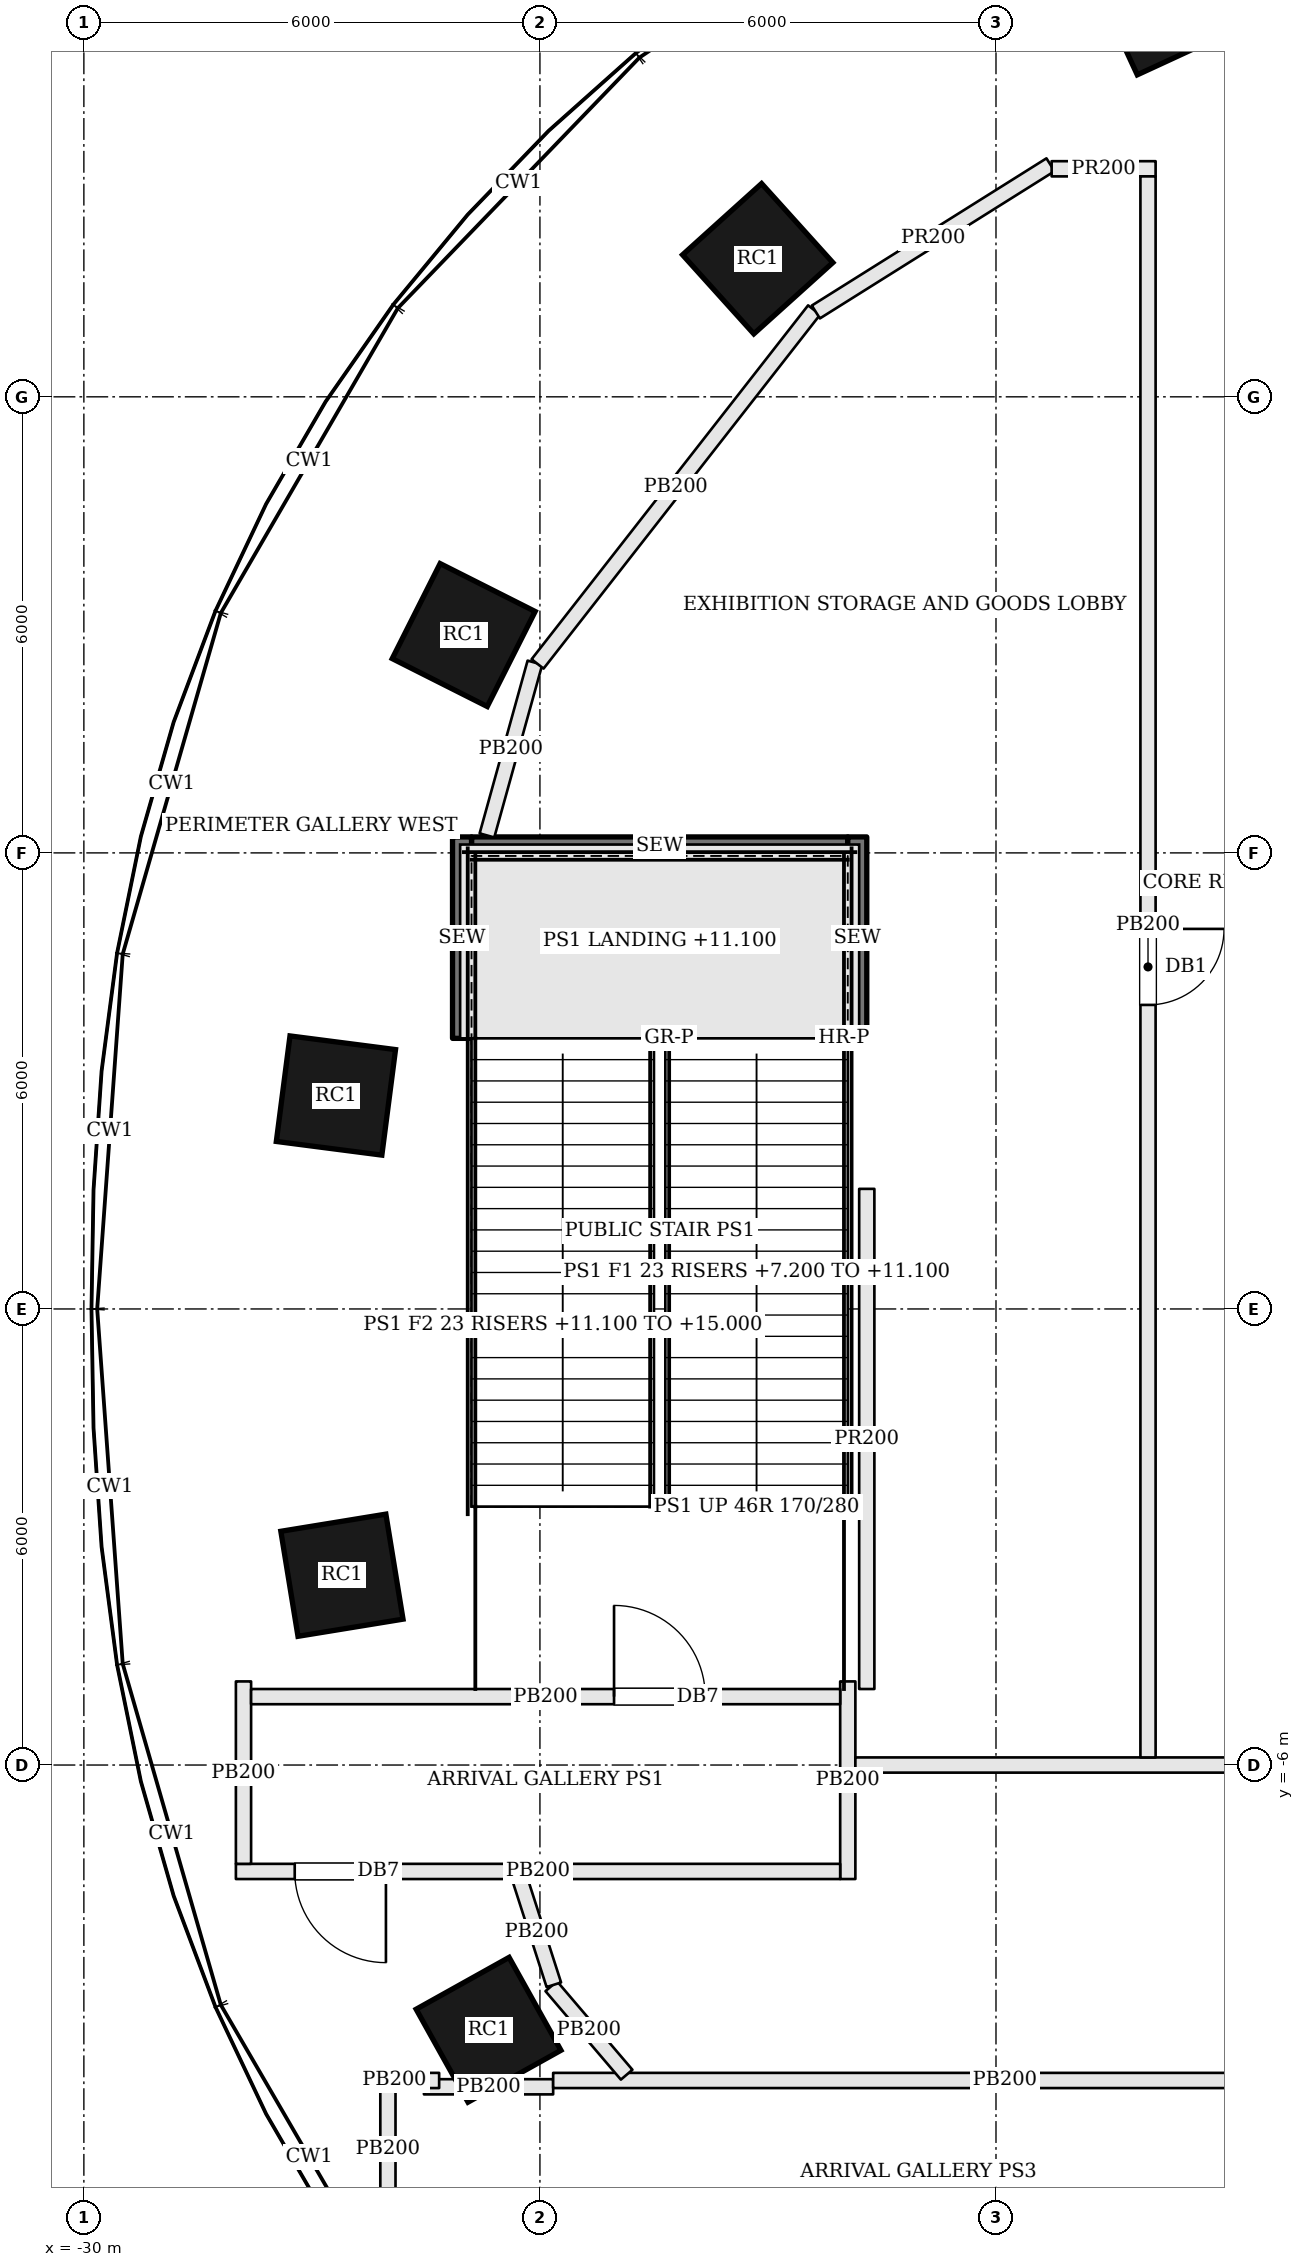
"""IFC4 building model, lengths in metres.
Left out: names, types, materials, properties, quantities, classifications, styles, units other than length and angle.
Written with IfcOpenShell. Run it as: python <this file> out.ifc"""

import sys

from ifc_helpers import new_model, si_unit, direction, frame, frame_2d, origin, origin_2d, place, context, subcontext, project, spatial, rectangle, extrude, element, fill, save


model = new_model("IFC4")
c1 = context("Model", 3, precision=1e-05, world=origin(), true_north=direction((0.0, 1.0)))
c2 = subcontext(c1, "Body", "Model", "MODEL_VIEW")
j1 = project(units=[si_unit("LENGTHUNIT", "METRE"), si_unit("PLANEANGLEUNIT", "RADIAN")], contexts=[c1])
p1 = place(None, origin())
s1 = spatial("IfcSite", under=j1, at=p1, CompositionType="ELEMENT")
p2 = place(p1, origin())
s2 = spatial("IfcBuilding", under=s1, at=p2, CompositionType="ELEMENT")
p3 = place(p2, frame((0.0, 0.0, 7.2)))
s3 = spatial("IfcBuildingStorey", under=s2, at=p3, CompositionType="ELEMENT", Elevation=7.2)
for number, where, z_axis, x_axis in (
    (1, (-15.799, 17.165, 0.0), (0.0, 0.0, 1.0), (-0.908, -0.419, 0.0)),
    (2, (-21.135, 13.817, 0.0), (0.0, 0.0, 1.0), (-0.743, -0.67, 0.0)),
    (3, (-25.003, 8.866, 0.0), (0.0, 0.0, 1.0), (-0.45, -0.893, 0.0)),
    (4, (-26.684, 2.808, 0.0), (0.0, 0.0, 1.0), (-0.128, -0.992, 0.0)),
    (5, (-26.605, -3.503, 0.0), (0.0, 0.0, 1.0), (0.161, -0.987, 0.0)),
    (6, (-24.676, -9.483, 0.0), (0.0, 0.0, 1.0), (0.487, -0.873, 0.0)),
):
    element("IfcColumn", number, at=place(p3, frame(where, z_axis=z_axis, x_axis=x_axis)), inside=s3, PredefinedType="COLUMN", context=c2, shape_type="SweptSolid", body=[
        extrude(rectangle(XDim=1.4, YDim=1.4, at=origin_2d()), origin(), (0.0, 0.0, 1.0), 7.8),
    ])
p4 = place(p3, frame((-19.95, -4.9, 0.0), z_axis=(0.0, 0.0, 1.0), x_axis=(0.0, -1.0, 0.0)))
e7 = element("IfcWall", 7, at=p4, inside=s3, PredefinedType="PARTITIONING", context=c2, shape_type="SweptSolid", body=[
    extrude(rectangle(XDim=2.6, YDim=0.2, at=frame_2d((1.3, 0.0))), origin(), (0.0, 0.0, 1.0), 6.83),
])
p5 = place(p3, frame((-20.05, -7.4, 0.0), z_axis=(0.0, 0.0, 1.0), x_axis=(-1.0, 0.0, 0.0)))
e8 = element("IfcWall", 8, at=p5, inside=s3, PredefinedType="PARTITIONING", context=c2, shape_type="SweptSolid", body=[
    extrude(rectangle(XDim=7.95, YDim=0.2, at=frame_2d((3.975, 0.0))), origin(), (0.0, 0.0, 1.0), 6.83),
])
p6 = place(p5, frame((5.976, 0.0, 0.0)))
e9 = element("IfcOpeningElement", 9, at=p6, cuts=e8, PredefinedType="OPENING", context=c2, shape_type="SweptSolid", body=[
    extrude(rectangle(XDim=1.2, YDim=2.1, at=frame_2d((0.6, 1.05))), frame((0.0, 0.11, 0.0), z_axis=(0.0, -1.0, 0.0), x_axis=(1.0, 0.0, 0.0)), (0.0, 0.0, 1.0), 0.22),
])
p7 = place(p3, frame((-27.9, -7.3, 0.0), z_axis=(0.0, 0.0, 1.0), x_axis=(0.0, 1.0, 0.0)))
e10 = element("IfcWall", 10, at=p7, inside=s3, PredefinedType="PARTITIONING", context=c2, shape_type="SweptSolid", body=[
    extrude(rectangle(XDim=2.4, YDim=0.2, at=frame_2d((1.2, 0.0))), origin(), (0.0, 0.0, 1.0), 6.83),
])
p8 = place(p3, frame((-27.8, -5.1, 0.0), z_axis=(0.0, 0.0, 1.0), x_axis=(1.0, 0.0, 0.0)))
e11 = element("IfcWall", 11, at=p8, inside=s3, PredefinedType="PARTITIONING", context=c2, shape_type="SweptSolid", body=[
    extrude(rectangle(XDim=7.75, YDim=0.2, at=frame_2d((3.875, 0.0))), origin(), (0.0, 0.0, 1.0), 6.83),
])
p9 = place(p8, frame((4.775, 0.0, 0.0)))
e12 = element("IfcOpeningElement", 12, at=p9, cuts=e11, PredefinedType="OPENING", context=c2, shape_type="SweptSolid", body=[
    extrude(rectangle(XDim=1.2, YDim=2.1, at=frame_2d((0.6, 1.05))), frame((0.0, 0.11, 0.0), z_axis=(0.0, -1.0, 0.0), x_axis=(1.0, 0.0, 0.0)), (0.0, 0.0, 1.0), 0.22),
])
p10 = place(p3, frame((-25.526, -10.233, 0.0), z_axis=(0.0, 0.0, 1.0), x_axis=(1.0, 0.0, 0.0)))
e13 = element("IfcWall", 13, at=p10, inside=s3, PredefinedType="PARTITIONING", context=c2, shape_type="SweptSolid", body=[
    extrude(rectangle(XDim=1.7, YDim=0.2, at=frame_2d((0.85, 0.0))), origin(), (0.0, 0.0, 1.0), 6.83),
])
p11 = place(p3, frame((-23.826, -10.15, 0.0), z_axis=(0.0, 0.0, 1.0), x_axis=(1.0, 0.0, 0.0)))
e14 = element("IfcWall", 14, at=p11, inside=s3, PredefinedType="PARTITIONING", context=c2, shape_type="SweptSolid", body=[
    extrude(rectangle(XDim=11.886, YDim=0.2, at=frame_2d((5.943, 0.0))), origin(), (0.0, 0.0, 1.0), 6.83),
])
p12 = place(p3, frame((-26.0, -12.063, 0.0), z_axis=(0.0, 0.0, 1.0), x_axis=(0.0, 1.0, 0.0)))
e15 = element("IfcWall", 15, at=p12, inside=s3, PredefinedType="PARTITIONING", context=c2, shape_type="SweptSolid", body=[
    extrude(rectangle(XDim=2.013, YDim=0.2, at=frame_2d((1.006, 0.0))), origin(), (0.0, 0.0, 1.0), 6.83),
])
p13 = place(p3, frame((-25.9, -10.15, 0.0), z_axis=(0.0, 0.0, 1.0), x_axis=(1.0, 0.0, 0.0)))
e16 = element("IfcWall", 16, at=p13, inside=s3, PredefinedType="PARTITIONING", context=c2, shape_type="SweptSolid", body=[
    extrude(rectangle(XDim=0.574, YDim=0.2, at=frame_2d((0.287, 0.0))), origin(), (0.0, 0.0, 1.0), 6.83),
])
p14 = place(p3, frame((-19.85, -6.0, 0.0), z_axis=(0.0, 0.0, 1.0), x_axis=(1.0, 0.0, 0.0)))
e17 = element("IfcWall", 17, at=p14, inside=s3, PredefinedType="PARTITIONING", context=c2, shape_type="SweptSolid", body=[
    extrude(rectangle(XDim=39.7, YDim=0.2, at=frame_2d((19.85, 0.0))), origin(), (0.0, 0.0, 1.0), 6.83),
])
p15 = place(p14, frame((13.172, 0.0, 0.0)))
e18 = element("IfcOpeningElement", 18, at=p15, cuts=e17, PredefinedType="OPENING", context=c2, shape_type="SweptSolid", body=[
    extrude(rectangle(XDim=1.2, YDim=2.1, at=frame_2d((0.6, 1.05))), frame((0.0, 0.11, 0.0), z_axis=(0.0, -1.0, 0.0), x_axis=(1.0, 0.0, 0.0)), (0.0, 0.0, 1.0), 0.22),
])
p16 = place(p14, frame((24.211, 0.0, 0.0)))
e19 = element("IfcOpeningElement", 19, at=p16, cuts=e17, PredefinedType="OPENING", context=c2, shape_type="SweptSolid", body=[
    extrude(rectangle(XDim=2.4, YDim=2.4, at=frame_2d((1.2, 1.2))), frame((0.0, 0.11, 0.0), z_axis=(0.0, -1.0, 0.0), x_axis=(1.0, 0.0, 0.0)), (0.0, 0.0, 1.0), 0.22),
])
p17 = place(p14, frame((7.011, 0.0, 0.0)))
e20 = element("IfcOpeningElement", 20, at=p17, cuts=e17, PredefinedType="OPENING", context=c2, shape_type="SweptSolid", body=[
    extrude(rectangle(XDim=2.4, YDim=2.4, at=frame_2d((1.2, 1.2))), frame((0.0, 0.11, 0.0), z_axis=(0.0, -1.0, 0.0), x_axis=(1.0, 0.0, 0.0)), (0.0, 0.0, 1.0), 0.22),
])
p18 = place(p3, frame((-19.7, -5.0, 0.0), z_axis=(0.0, 0.0, 1.0), x_axis=(0.0, 1.0, 0.0)))
e21 = element("IfcWall", 21, at=p18, inside=s3, PredefinedType="PARTITIONING", context=c2, shape_type="SweptSolid", body=[
    extrude(rectangle(XDim=6.58, YDim=0.2, at=frame_2d((3.29, 0.0))), origin(), (0.0, 0.0, 1.0), 6.934),
])
p19 = place(p3, frame((-24.697, 6.23, 0.0), z_axis=(0.0, 0.0, 1.0), x_axis=(0.267537104114, 0.963547558724, 0.0)))
e22 = element("IfcWall", 22, at=p19, inside=s3, PredefinedType="PARTITIONING", context=c2, shape_type="SweptSolid", body=[
    extrude(rectangle(XDim=2.359, YDim=0.2, at=frame_2d((1.179, 0.0))), origin(), (0.0, 0.0, 1.0), 6.83),
])
p20 = place(p3, frame((-24.031, 8.486, 0.0), z_axis=(0.0, 0.0, 1.0), x_axis=(0.615689744566, 0.787988666439, 0.0)))
e23 = element("IfcWall", 23, at=p20, inside=s3, PredefinedType="PARTITIONING", context=c2, shape_type="SweptSolid", body=[
    extrude(rectangle(XDim=5.909, YDim=0.2, at=frame_2d((2.954, 0.0))), origin(), (0.0, 0.0, 1.0), 6.83),
])
p21 = place(p3, frame((-20.37, 13.116, 0.0), z_axis=(0.0, 0.0, 1.0), x_axis=(0.847067442561, 0.531485416313, 0.0)))
e24 = element("IfcWall", 24, at=p21, inside=s3, PredefinedType="PARTITIONING", context=c2, shape_type="SweptSolid", body=[
    extrude(rectangle(XDim=3.645, YDim=0.2, at=frame_2d((1.822, 0.0))), origin(), (0.0, 0.0, 1.0), 6.934),
])
p22 = place(p3, frame((-17.268, 15.0, 0.0), z_axis=(0.0, 0.0, 1.0), x_axis=(1.0, 0.0, 0.0)))
e25 = element("IfcWall", 25, at=p22, inside=s3, PredefinedType="PARTITIONING", context=c2, shape_type="SweptSolid", body=[
    extrude(rectangle(XDim=1.368, YDim=0.2, at=frame_2d((0.684, 0.0))), origin(), (0.0, 0.0, 1.0), 6.934),
])
p23 = place(p3, frame((-16.0, 14.9, 0.0), z_axis=(0.0, 0.0, 1.0), x_axis=(0.0, -1.0, 0.0)))
e26 = element("IfcWall", 26, at=p23, inside=s3, PredefinedType="PARTITIONING", context=c2, shape_type="SweptSolid", body=[
    extrude(rectangle(XDim=20.8, YDim=0.2, at=frame_2d((10.4, 0.0))), origin(), (0.0, 0.0, 1.0), 6.83),
])
p24 = place(p23, frame((9.9, 0.0, 0.0)))
e27 = element("IfcOpeningElement", 27, at=p24, cuts=e26, PredefinedType="OPENING", context=c2, shape_type="SweptSolid", body=[
    extrude(rectangle(XDim=1.0, YDim=2.1, at=frame_2d((0.5, 1.05))), frame((0.0, 0.11, 0.0), z_axis=(0.0, -1.0, 0.0), x_axis=(1.0, 0.0, 0.0)), (0.0, 0.0, 1.0), 0.22),
])
p25 = place(p3, frame((-22.859, -10.074, 0.0), z_axis=(0.0, 0.0, 1.0), x_axis=(-0.648685680777, 0.761056428628, 0.0)))
e28 = element("IfcWall", 28, at=p25, inside=s3, PredefinedType="PARTITIONING", context=c2, shape_type="SweptSolid", body=[
    extrude(rectangle(XDim=1.53, YDim=0.2, at=frame_2d((0.765, 0.0))), origin(), (0.0, 0.0, 1.0), 6.83),
])
p26 = place(p3, frame((-23.817, -8.891, 0.0), z_axis=(0.0, 0.0, 1.0), x_axis=(-0.306321721395, 0.951928045076, 0.0)))
e29 = element("IfcWall", 29, at=p26, inside=s3, PredefinedType="PARTITIONING", context=c2, shape_type="SweptSolid", body=[
    extrude(rectangle(XDim=1.467, YDim=0.2, at=frame_2d((0.733, 0.0))), origin(), (0.0, 0.0, 1.0), 6.83),
])
p27 = place(p3, frame((-19.95, 6.085, 0.0), z_axis=(0.0, 0.0, 1.0), x_axis=(-1.0, 0.0, 0.0)))
e30 = element("IfcWall", 30, at=p27, inside=s3, PredefinedType="SOLIDWALL", context=c2, shape_type="SweptSolid", body=[
    extrude(rectangle(XDim=4.95, YDim=0.25, at=frame_2d((2.475, 0.0))), origin(), (0.0, 0.0, 1.0), 7.55),
])
for number, where, z_axis, x_axis in (
    (31, (-25.025, 3.56, 0.0), (0.0, 0.0, 1.0), (0.0, 1.0, 0.0)),
    (32, (-19.825, 3.56, 0.0), (0.0, 0.0, 1.0), (0.0, 1.0, 0.0)),
):
    element("IfcWall", number, at=place(p3, frame(where, z_axis=z_axis, x_axis=x_axis)), inside=s3, PredefinedType="SOLIDWALL", context=c2, shape_type="SweptSolid", body=[
        extrude(rectangle(XDim=2.65, YDim=0.25, at=frame_2d((1.325, 0.0))), origin(), (0.0, 0.0, 1.0), 7.55),
    ])
p28 = place(p9, origin())
e33 = element("IfcDoor", 33, at=p28, inside=s3, OperationType="SINGLE_SWING_LEFT", PredefinedType="DOOR", context=c2, shape_type="SweptSolid", body=[
    extrude(rectangle(XDim=1.2, YDim=2.1, at=frame_2d((0.6, 1.05))), frame((0.0, 0.025, 0.0), z_axis=(0.0, -1.0, 0.0), x_axis=(1.0, 0.0, 0.0)), (0.0, 0.0, 1.0), 0.05),
])
fill(e12, e33)
p29 = place(p6, origin())
e34 = element("IfcDoor", 34, at=p29, inside=s3, OperationType="SINGLE_SWING_LEFT", PredefinedType="DOOR", context=c2, shape_type="SweptSolid", body=[
    extrude(rectangle(XDim=1.2, YDim=2.1, at=frame_2d((0.6, 1.05))), frame((0.0, 0.025, 0.0), z_axis=(0.0, -1.0, 0.0), x_axis=(1.0, 0.0, 0.0)), (0.0, 0.0, 1.0), 0.05),
])
fill(e9, e34)
p30 = place(p24, origin())
e35 = element("IfcDoor", 35, at=p30, inside=s3, OperationType="SINGLE_SWING_LEFT", PredefinedType="DOOR", context=c2, shape_type="SweptSolid", body=[
    extrude(rectangle(XDim=1.0, YDim=2.1, at=frame_2d((0.5, 1.05))), frame((0.0, 0.025, 0.0), z_axis=(0.0, -1.0, 0.0), x_axis=(1.0, 0.0, 0.0)), (0.0, 0.0, 1.0), 0.05),
])
fill(e27, e35)
save(model, sys.argv[1])
